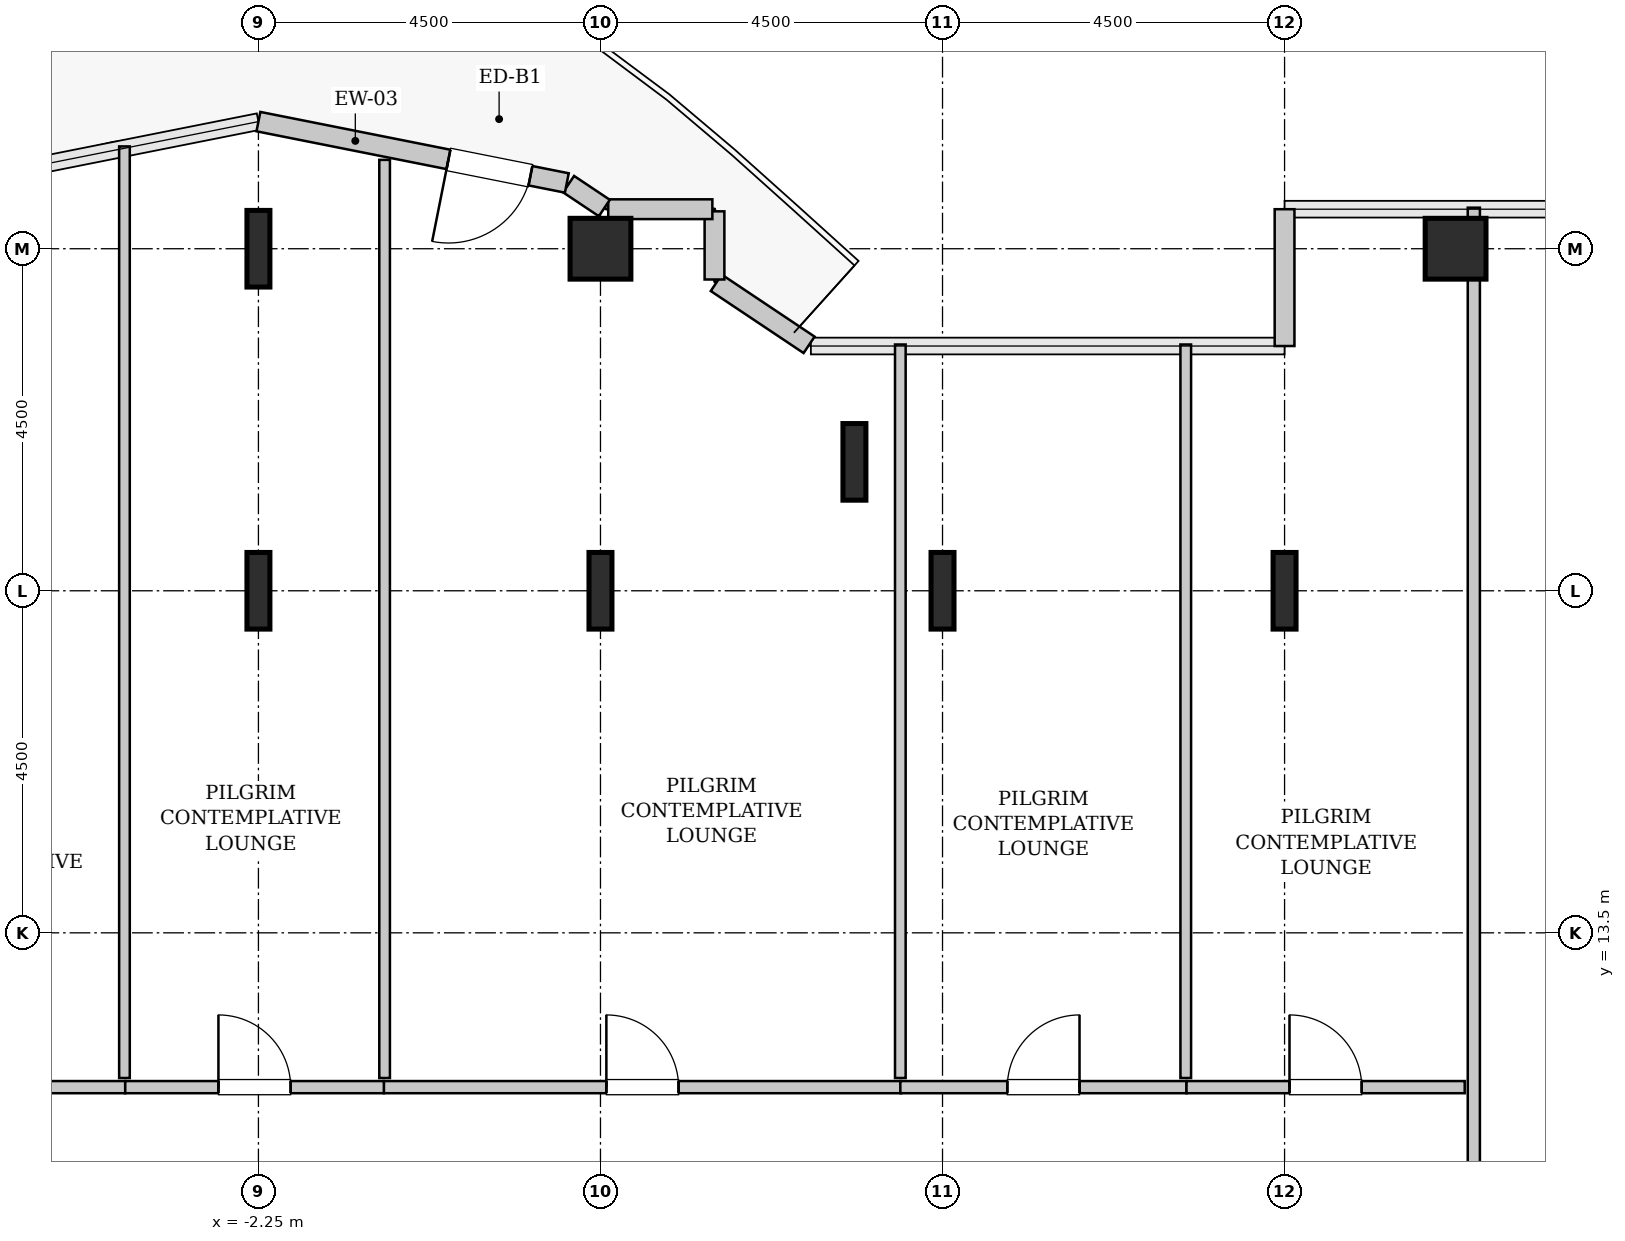
"""IFC4 building model, lengths in metres.
Left out: names, types, materials, properties, quantities, classifications, styles, units other than length and angle.
Written with IfcOpenShell. Run it as: python <this file> out.ifc"""

import sys

from ifc_helpers import new_model, si_unit, direction, frame, frame_2d, origin, origin_2d, place, context, subcontext, project, spatial, rectangle, hollow_rectangle, i_section, extrude, source, transform, mapped, element, fill, save


model = new_model("IFC4")
c1 = context("Model", 3, precision=1e-05, world=origin(), true_north=direction((0.0, 1.0)))
c2 = subcontext(c1, "Body", "Model", "MODEL_VIEW")
j1 = project(units=[si_unit("LENGTHUNIT", "METRE"), si_unit("PLANEANGLEUNIT", "RADIAN")], contexts=[c1])
p1 = place(None, origin())
s1 = spatial("IfcSite", under=j1, at=p1, CompositionType="ELEMENT")
p2 = place(p1, origin())
s2 = spatial("IfcBuilding", under=s1, at=p2, CompositionType="ELEMENT")
p3 = place(p2, frame((0.0, 0.0, 113.6)))
s3 = spatial("IfcBuildingStorey", under=s2, at=p3, CompositionType="ELEMENT", Elevation=113.6)
m1 = source(origin(), c2, "Body", "SweptSolid", [
    extrude(i_section(OverallWidth=0.302, OverallDepth=1.008, WebThickness=0.021, FlangeThickness=0.04, FilletRadius=0.03, at=origin_2d()), origin(), (0.0, 0.0, 1.0), 3.8),
])
for number, where, z_axis, x_axis in (
    (1, (-2.25, 18.0, 0.0), (0.0, 0.0, 1.0), (1.0, 0.0, 0.0)),
    (2, (-2.25, 22.5, 0.0), (0.0, 0.0, 1.0), (1.0, 0.0, 0.0)),
    (3, (2.25, 18.0, 0.0), (0.0, 0.0, 1.0), (1.0, 0.0, 0.0)),
):
    element("IfcColumn", number, at=place(p3, frame(where, z_axis=z_axis, x_axis=x_axis)), inside=s3, PredefinedType="COLUMN", context=c2, shape_type="MappedRepresentation", body=[
        mapped(m1, transform((0.0, 0.0, 0.0), x_axis=(1.0, 0.0, 0.0), y_axis=(0.0, 1.0, 0.0), z_axis=(0.0, 0.0, 1.0), scale=1.0)),
    ])
m2 = source(origin(), c2, "Body", "SweptSolid", [
    extrude(hollow_rectangle(XDim=0.8, YDim=0.8, WallThickness=0.04, InnerFilletRadius=0.04, OuterFilletRadius=0.08, at=origin_2d()), origin(), (0.0, 0.0, 1.0), 3.8),
])
p4 = place(p3, frame((2.25, 22.5, 0.0), z_axis=(0.0, 0.0, 1.0), x_axis=(1.0, 0.0, 0.0)))
e4 = element("IfcColumn", 4, at=p4, inside=s3, PredefinedType="COLUMN", context=c2, shape_type="MappedRepresentation", body=[
    mapped(m2, transform((0.0, 0.0, 0.0), x_axis=(1.0, 0.0, 0.0), y_axis=(0.0, 1.0, 0.0), z_axis=(0.0, 0.0, 1.0), scale=1.0)),
])
for number, where, z_axis, x_axis in (
    (5, (5.591, 19.696, 0.0), (0.0, 0.0, 1.0), (1.0, 0.0, 0.0)),
    (6, (6.75, 18.0, 0.0), (0.0, 0.0, 1.0), (1.0, 0.0, 0.0)),
    (7, (11.25, 18.0, 0.0), (0.0, 0.0, 1.0), (1.0, 0.0, 0.0)),
):
    element("IfcColumn", number, at=place(p3, frame(where, z_axis=z_axis, x_axis=x_axis)), inside=s3, PredefinedType="COLUMN", context=c2, shape_type="MappedRepresentation", body=[
        mapped(m1, transform((0.0, 0.0, 0.0), x_axis=(1.0, 0.0, 0.0), y_axis=(0.0, 1.0, 0.0), z_axis=(0.0, 0.0, 1.0), scale=1.0)),
    ])
p5 = place(p3, frame((13.5, 22.5, 0.0), z_axis=(0.0, 0.0, 1.0), x_axis=(1.0, 0.0, 0.0)))
e8 = element("IfcColumn", 8, at=p5, inside=s3, PredefinedType="COLUMN", context=c2, shape_type="MappedRepresentation", body=[
    mapped(m2, transform((0.0, 0.0, 0.0), x_axis=(1.0, 0.0, 0.0), y_axis=(0.0, 1.0, 0.0), z_axis=(0.0, 0.0, 1.0), scale=1.0)),
])
m3 = source(origin(), c2, "Body", "SweptSolid", [
    extrude(rectangle(XDim=1.8, YDim=0.26, at=frame_2d((0.9, 0.0))), origin(), (0.0, 0.0, 1.0), 3.55),
])
p6 = place(p3, frame((11.25, 23.02, 0.0), z_axis=(0.0, 0.0, 1.0), x_axis=(0.0, -1.0, 0.0)))
e9 = element("IfcWall", 9, at=p6, inside=s3, PredefinedType="SOLIDWALL", context=c2, shape_type="MappedRepresentation", body=[
    mapped(m3, transform((0.0, 0.0, 0.0), x_axis=(1.0, 0.0, 0.0), y_axis=(0.0, 1.0, 0.0), z_axis=(0.0, 0.0, 1.0), scale=1.0)),
])
m4 = source(origin(), c2, "Body", "SweptSolid", [
    extrude(rectangle(XDim=1.469, YDim=0.26, at=frame_2d((0.734, 0.0))), origin(), (0.0, 0.0, 1.0), 3.55),
])
p7 = place(p3, frame((4.995, 21.236, 0.0), z_axis=(0.0, 0.0, 1.0), x_axis=(-0.831461760506, 0.555581983884, 0.0)))
e10 = element("IfcWall", 10, at=p7, inside=s3, PredefinedType="SOLIDWALL", context=c2, shape_type="MappedRepresentation", body=[
    mapped(m4, transform((0.0, 0.0, 0.0), x_axis=(1.0, 0.0, 0.0), y_axis=(0.0, 1.0, 0.0), z_axis=(0.0, 0.0, 1.0), scale=1.0)),
])
m5 = source(origin(), c2, "Body", "SweptSolid", [
    extrude(rectangle(XDim=0.897, YDim=0.26, at=frame_2d((0.448, 0.0))), origin(), (0.0, 0.0, 1.0), 3.55),
])
p8 = place(p3, frame((3.75, 22.095, 0.0), z_axis=(0.0, 0.0, 1.0), x_axis=(0.0, 1.0, 0.0)))
e11 = element("IfcWall", 11, at=p8, inside=s3, PredefinedType="SOLIDWALL", context=c2, shape_type="MappedRepresentation", body=[
    mapped(m5, transform((0.0, 0.0, 0.0), x_axis=(1.0, 0.0, 0.0), y_axis=(0.0, 1.0, 0.0), z_axis=(0.0, 0.0, 1.0), scale=1.0)),
])
m6 = source(origin(), c2, "Body", "SweptSolid", [
    extrude(rectangle(XDim=1.37, YDim=0.26, at=frame_2d((0.685, 0.0))), origin(), (0.0, 0.0, 1.0), 3.55),
])
p9 = place(p3, frame((3.722, 23.02, 0.0), z_axis=(0.0, 0.0, 1.0), x_axis=(-1.0, 0.0, 0.0)))
e12 = element("IfcWall", 12, at=p9, inside=s3, PredefinedType="SOLIDWALL", context=c2, shape_type="MappedRepresentation", body=[
    mapped(m6, transform((0.0, 0.0, 0.0), x_axis=(1.0, 0.0, 0.0), y_axis=(0.0, 1.0, 0.0), z_axis=(0.0, 0.0, 1.0), scale=1.0)),
])
m7 = source(origin(), c2, "Body", "SweptSolid", [
    extrude(rectangle(XDim=0.565, YDim=0.26, at=frame_2d((0.283, 0.0))), origin(), (0.0, 0.0, 1.0), 3.55),
])
p10 = place(p3, frame((2.301, 23.036, 0.0), z_axis=(0.0, 0.0, 1.0), x_axis=(-0.831651492666, 0.555297933317, 0.0)))
e13 = element("IfcWall", 13, at=p10, inside=s3, PredefinedType="SOLIDWALL", context=c2, shape_type="MappedRepresentation", body=[
    mapped(m7, transform((0.0, 0.0, 0.0), x_axis=(1.0, 0.0, 0.0), y_axis=(0.0, 1.0, 0.0), z_axis=(0.0, 0.0, 1.0), scale=1.0)),
])
m8 = source(origin(), c2, "Body", "SweptSolid", [
    extrude(rectangle(XDim=4.137, YDim=0.26, at=frame_2d((2.068, 0.0))), origin(), (0.0, 0.0, 1.0), 3.55),
])
p11 = place(p3, frame((1.807, 23.365, 0.0), z_axis=(0.0, 0.0, 1.0), x_axis=(-0.980782170794, 0.195105954428, 0.0)))
e14 = element("IfcWall", 14, at=p11, inside=s3, PredefinedType="SOLIDWALL", context=c2, shape_type="MappedRepresentation", body=[
    mapped(m8, transform((0.0, 0.0, 0.0), x_axis=(1.0, 0.0, 0.0), y_axis=(0.0, 1.0, 0.0), z_axis=(0.0, 0.0, 1.0), scale=1.0)),
])
p12 = place(p11, frame((0.488, 0.0, 0.0)))
e15 = element("IfcOpeningElement", 15, at=p12, cuts=e14, PredefinedType="OPENING", context=c2, shape_type="SweptSolid", body=[
    extrude(rectangle(XDim=1.1, YDim=2.2, at=frame_2d((0.55, 1.1))), frame((0.0, 0.14, 0.0), z_axis=(0.0, -1.0, 0.0), x_axis=(1.0, 0.0, 0.0)), (0.0, 0.0, 1.0), 0.28),
])
m9 = source(origin(), c2, "Body", "SweptSolid", [
    extrude(rectangle(XDim=15.135, YDim=0.16, at=frame_2d((7.567, 0.0))), origin(), (0.0, 0.0, 1.0), 3.535),
])
p13 = place(p3, frame((13.74, 7.905, 0.0), z_axis=(0.0, 0.0, 1.0), x_axis=(0.0, 1.0, 0.0)))
e16 = element("IfcWall", 16, at=p13, inside=s3, PredefinedType="PARTITIONING", context=c2, shape_type="MappedRepresentation", body=[
    mapped(m9, transform((0.0, 0.0, 0.0), x_axis=(1.0, 0.0, 0.0), y_axis=(0.0, 1.0, 0.0), z_axis=(0.0, 0.0, 1.0), scale=1.0)),
])
p14 = place(p13, frame((1.327, 0.0, 0.0)))
e17 = element("IfcOpeningElement", 17, at=p14, cuts=e16, PredefinedType="OPENING", context=c2, shape_type="SweptSolid", body=[
    extrude(rectangle(XDim=0.95, YDim=2.1, at=frame_2d((0.475, 1.05))), frame((0.0, 0.09, 0.0), z_axis=(0.0, -1.0, 0.0), x_axis=(1.0, 0.0, 0.0)), (0.0, 0.0, 1.0), 0.18),
])
m10 = source(origin(), c2, "Body", "SweptSolid", [
    extrude(rectangle(XDim=6.805, YDim=0.16, at=frame_2d((3.403, 0.0))), origin(), (0.0, 0.0, 1.0), 3.535),
])
p15 = place(p3, frame((-0.6, 11.47, 0.0), z_axis=(0.0, 0.0, 1.0), x_axis=(1.0, 0.0, 0.0)))
e18 = element("IfcWall", 18, at=p15, inside=s3, PredefinedType="PARTITIONING", context=c2, shape_type="MappedRepresentation", body=[
    mapped(m10, transform((0.0, 0.0, 0.0), x_axis=(1.0, 0.0, 0.0), y_axis=(0.0, 1.0, 0.0), z_axis=(0.0, 0.0, 1.0), scale=1.0)),
])
p16 = place(p15, frame((2.927, 0.0, 0.0)))
e19 = element("IfcOpeningElement", 19, at=p16, cuts=e18, PredefinedType="OPENING", context=c2, shape_type="SweptSolid", body=[
    extrude(rectangle(XDim=0.95, YDim=2.1, at=frame_2d((0.475, 1.05))), frame((0.0, 0.09, 0.0), z_axis=(0.0, -1.0, 0.0), x_axis=(1.0, 0.0, 0.0)), (0.0, 0.0, 1.0), 0.18),
])
m11 = source(origin(), c2, "Body", "SweptSolid", [
    extrude(rectangle(XDim=12.079, YDim=0.14, at=frame_2d((6.04, 0.0))), origin(), (0.0, 0.0, 1.0), 3.535),
])
p17 = place(p3, frame((-0.59, 11.59, 0.0), z_axis=(0.0, 0.0, 1.0), x_axis=(0.0, 1.0, 0.0)))
e20 = element("IfcWall", 20, at=p17, inside=s3, PredefinedType="PARTITIONING", context=c2, shape_type="MappedRepresentation", body=[
    mapped(m11, transform((0.0, 0.0, 0.0), x_axis=(1.0, 0.0, 0.0), y_axis=(0.0, 1.0, 0.0), z_axis=(0.0, 0.0, 1.0), scale=1.0)),
])
m12 = source(origin(), c2, "Body", "SweptSolid", [
    extrude(rectangle(XDim=9.65, YDim=0.14, at=frame_2d((4.825, 0.0))), origin(), (0.0, 0.0, 1.0), 3.535),
])
p18 = place(p3, frame((6.195, 11.59, 0.0), z_axis=(0.0, 0.0, 1.0), x_axis=(0.0, 1.0, 0.0)))
e21 = element("IfcWall", 21, at=p18, inside=s3, PredefinedType="PARTITIONING", context=c2, shape_type="MappedRepresentation", body=[
    mapped(m12, transform((0.0, 0.0, 0.0), x_axis=(1.0, 0.0, 0.0), y_axis=(0.0, 1.0, 0.0), z_axis=(0.0, 0.0, 1.0), scale=1.0)),
])
m13 = source(origin(), c2, "Body", "SweptSolid", [
    extrude(rectangle(XDim=3.403, YDim=0.16, at=frame_2d((1.701, 0.0))), origin(), (0.0, 0.0, 1.0), 3.535),
])
p19 = place(p3, frame((-7.405, 11.47, 0.0), z_axis=(0.0, 0.0, 1.0), x_axis=(1.0, 0.0, 0.0)))
e22 = element("IfcWall", 22, at=p19, inside=s3, PredefinedType="PARTITIONING", context=c2, shape_type="MappedRepresentation", body=[
    mapped(m13, transform((0.0, 0.0, 0.0), x_axis=(1.0, 0.0, 0.0), y_axis=(0.0, 1.0, 0.0), z_axis=(0.0, 0.0, 1.0), scale=1.0)),
])
p20 = place(p19, frame((1.226, 0.0, 0.0)))
e23 = element("IfcOpeningElement", 23, at=p20, cuts=e22, PredefinedType="OPENING", context=c2, shape_type="SweptSolid", body=[
    extrude(rectangle(XDim=0.95, YDim=2.1, at=frame_2d((0.475, 1.05))), frame((0.0, 0.09, 0.0), z_axis=(0.0, -1.0, 0.0), x_axis=(1.0, 0.0, 0.0)), (0.0, 0.0, 1.0), 0.18),
])
m14 = source(origin(), c2, "Body", "SweptSolid", [
    extrude(rectangle(XDim=12.256, YDim=0.14, at=frame_2d((6.128, 0.0))), origin(), (0.0, 0.0, 1.0), 3.535),
])
p21 = place(p3, frame((-4.012, 11.59, 0.0), z_axis=(0.0, 0.0, 1.0), x_axis=(0.0, 1.0, 0.0)))
e24 = element("IfcWall", 24, at=p21, inside=s3, PredefinedType="PARTITIONING", context=c2, shape_type="MappedRepresentation", body=[
    mapped(m14, transform((0.0, 0.0, 0.0), x_axis=(1.0, 0.0, 0.0), y_axis=(0.0, 1.0, 0.0), z_axis=(0.0, 0.0, 1.0), scale=1.0)),
])
m15 = source(origin(), c2, "Body", "SweptSolid", [
    extrude(rectangle(XDim=3.402, YDim=0.16, at=frame_2d((1.701, 0.0))), origin(), (0.0, 0.0, 1.0), 3.535),
])
p22 = place(p3, frame((-4.002, 11.47, 0.0), z_axis=(0.0, 0.0, 1.0), x_axis=(1.0, 0.0, 0.0)))
e25 = element("IfcWall", 25, at=p22, inside=s3, PredefinedType="PARTITIONING", context=c2, shape_type="MappedRepresentation", body=[
    mapped(m15, transform((0.0, 0.0, 0.0), x_axis=(1.0, 0.0, 0.0), y_axis=(0.0, 1.0, 0.0), z_axis=(0.0, 0.0, 1.0), scale=1.0)),
])
p23 = place(p22, frame((1.226, 0.0, 0.0)))
e26 = element("IfcOpeningElement", 26, at=p23, cuts=e25, PredefinedType="OPENING", context=c2, shape_type="SweptSolid", body=[
    extrude(rectangle(XDim=0.95, YDim=2.1, at=frame_2d((0.475, 1.05))), frame((0.0, 0.09, 0.0), z_axis=(0.0, -1.0, 0.0), x_axis=(1.0, 0.0, 0.0)), (0.0, 0.0, 1.0), 0.18),
])
m16 = source(origin(), c2, "Body", "SweptSolid", [
    extrude(rectangle(XDim=3.765, YDim=0.16, at=frame_2d((1.882, 0.0))), origin(), (0.0, 0.0, 1.0), 3.535),
])
p24 = place(p3, frame((6.195, 11.47, 0.0), z_axis=(0.0, 0.0, 1.0), x_axis=(1.0, 0.0, 0.0)))
e27 = element("IfcWall", 27, at=p24, inside=s3, PredefinedType="PARTITIONING", context=c2, shape_type="MappedRepresentation", body=[
    mapped(m16, transform((0.0, 0.0, 0.0), x_axis=(1.0, 0.0, 0.0), y_axis=(0.0, 1.0, 0.0), z_axis=(0.0, 0.0, 1.0), scale=1.0)),
])
p25 = place(p24, frame((1.407, 0.0, 0.0)))
e28 = element("IfcOpeningElement", 28, at=p25, cuts=e27, PredefinedType="OPENING", context=c2, shape_type="SweptSolid", body=[
    extrude(rectangle(XDim=0.95, YDim=2.1, at=frame_2d((0.475, 1.05))), frame((0.0, 0.09, 0.0), z_axis=(0.0, -1.0, 0.0), x_axis=(1.0, 0.0, 0.0)), (0.0, 0.0, 1.0), 0.18),
])
p26 = place(p3, frame((9.95, 11.59, 0.0), z_axis=(0.0, 0.0, 1.0), x_axis=(0.0, 1.0, 0.0)))
e29 = element("IfcWall", 29, at=p26, inside=s3, PredefinedType="PARTITIONING", context=c2, shape_type="MappedRepresentation", body=[
    mapped(m12, transform((0.0, 0.0, 0.0), x_axis=(1.0, 0.0, 0.0), y_axis=(0.0, 1.0, 0.0), z_axis=(0.0, 0.0, 1.0), scale=1.0)),
])
m17 = source(origin(), c2, "Body", "SweptSolid", [
    extrude(rectangle(XDim=3.66, YDim=0.16, at=frame_2d((1.83, 0.0))), origin(), (0.0, 0.0, 1.0), 3.535),
])
p27 = place(p3, frame((9.96, 11.47, 0.0), z_axis=(0.0, 0.0, 1.0), x_axis=(1.0, 0.0, 0.0)))
e30 = element("IfcWall", 30, at=p27, inside=s3, PredefinedType="PARTITIONING", context=c2, shape_type="MappedRepresentation", body=[
    mapped(m17, transform((0.0, 0.0, 0.0), x_axis=(1.0, 0.0, 0.0), y_axis=(0.0, 1.0, 0.0), z_axis=(0.0, 0.0, 1.0), scale=1.0)),
])
p28 = place(p27, frame((1.355, 0.0, 0.0)))
e31 = element("IfcOpeningElement", 31, at=p28, cuts=e30, PredefinedType="OPENING", context=c2, shape_type="SweptSolid", body=[
    extrude(rectangle(XDim=0.95, YDim=2.1, at=frame_2d((0.475, 1.05))), frame((0.0, 0.09, 0.0), z_axis=(0.0, -1.0, 0.0), x_axis=(1.0, 0.0, 0.0)), (0.0, 0.0, 1.0), 0.18),
])
m18 = source(origin(), c2, "Body", "SweptSolid", [
    extrude(rectangle(XDim=1.1, YDim=2.2, at=frame_2d((0.55, 1.1))), frame((0.0, 0.025, 0.0), z_axis=(0.0, -1.0, 0.0), x_axis=(1.0, 0.0, 0.0)), (0.0, 0.0, 1.0), 0.05),
])
p29 = place(p12, origin())
e32 = element("IfcDoor", 32, at=p29, inside=s3, OperationType="SINGLE_SWING_RIGHT", PredefinedType="DOOR", context=c2, shape_type="MappedRepresentation", body=[
    mapped(m18, transform((0.0, 0.0, 0.0), x_axis=(1.0, 0.0, 0.0), y_axis=(0.0, 1.0, 0.0), z_axis=(0.0, 0.0, 1.0), scale=1.0)),
])
fill(e15, e32)
m19 = source(origin(), c2, "Body", "SweptSolid", [
    extrude(rectangle(XDim=0.95, YDim=2.1, at=frame_2d((0.475, 1.05))), frame((0.0, 0.025, 0.0), z_axis=(0.0, -1.0, 0.0), x_axis=(1.0, 0.0, 0.0)), (0.0, 0.0, 1.0), 0.05),
])
p30 = place(p16, origin())
e33 = element("IfcDoor", 33, at=p30, inside=s3, OperationType="SINGLE_SWING_LEFT", PredefinedType="DOOR", context=c2, shape_type="MappedRepresentation", body=[
    mapped(m19, transform((0.0, 0.0, 0.0), x_axis=(1.0, 0.0, 0.0), y_axis=(0.0, 1.0, 0.0), z_axis=(0.0, 0.0, 1.0), scale=1.0)),
])
fill(e19, e33)
p31 = place(p23, origin())
e34 = element("IfcDoor", 34, at=p31, inside=s3, OperationType="SINGLE_SWING_LEFT", PredefinedType="DOOR", context=c2, shape_type="MappedRepresentation", body=[
    mapped(m19, transform((0.0, 0.0, 0.0), x_axis=(1.0, 0.0, 0.0), y_axis=(0.0, 1.0, 0.0), z_axis=(0.0, 0.0, 1.0), scale=1.0)),
])
fill(e26, e34)
p32 = place(p25, origin())
e35 = element("IfcDoor", 35, at=p32, inside=s3, OperationType="SINGLE_SWING_RIGHT", PredefinedType="DOOR", context=c2, shape_type="MappedRepresentation", body=[
    mapped(m19, transform((0.0, 0.0, 0.0), x_axis=(1.0, 0.0, 0.0), y_axis=(0.0, 1.0, 0.0), z_axis=(0.0, 0.0, 1.0), scale=1.0)),
])
fill(e28, e35)
p33 = place(p28, origin())
e36 = element("IfcDoor", 36, at=p33, inside=s3, OperationType="SINGLE_SWING_LEFT", PredefinedType="DOOR", context=c2, shape_type="MappedRepresentation", body=[
    mapped(m19, transform((0.0, 0.0, 0.0), x_axis=(1.0, 0.0, 0.0), y_axis=(0.0, 1.0, 0.0), z_axis=(0.0, 0.0, 1.0), scale=1.0)),
])
fill(e31, e36)
save(model, sys.argv[1])
